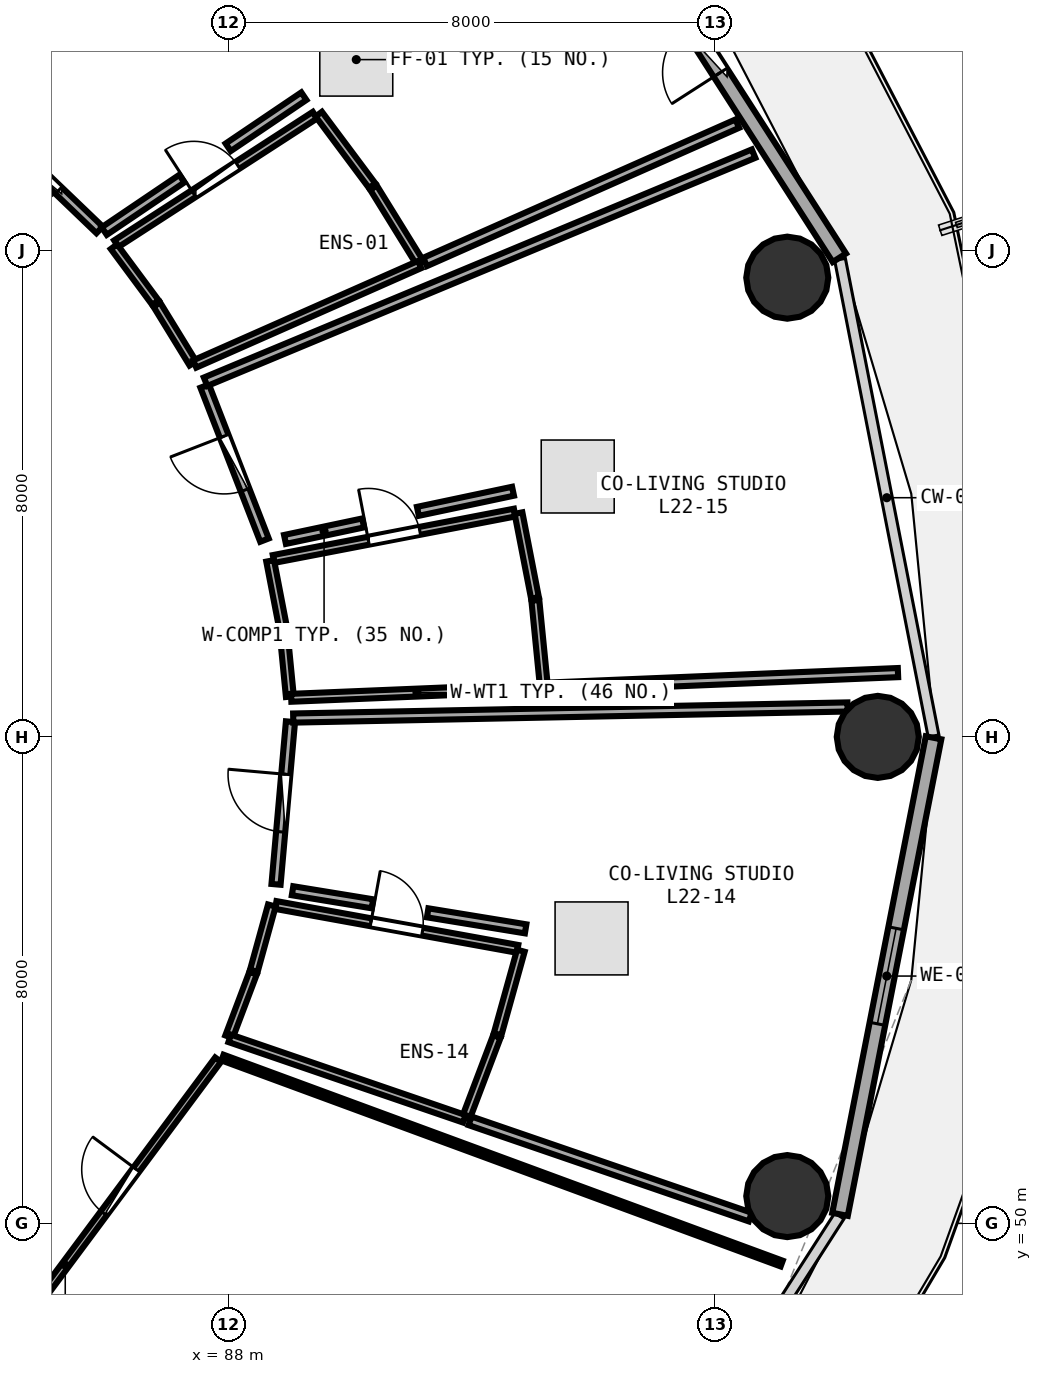
"""IFC4 building model, lengths in metres.
Left out: names, types, materials, properties, quantities, classifications, styles, units other than length and angle.
Written with IfcOpenShell. Run it as: python <this file> out.ifc"""

import sys

from ifc_helpers import new_model, si_unit, direction, frame, frame_2d, origin, origin_2d, place, context, subcontext, project, spatial, rectangle, circle, extrude, element, fill, save


model = new_model("IFC4")
c1 = context("Model", 3, precision=1e-05, world=origin(), true_north=direction((0.0, 1.0)))
c2 = subcontext(c1, "Body", "Model", "MODEL_VIEW")
j1 = project(units=[si_unit("LENGTHUNIT", "METRE"), si_unit("PLANEANGLEUNIT", "RADIAN")], contexts=[c1])
p1 = place(None, origin())
s1 = spatial("IfcSite", under=j1, at=p1, CompositionType="ELEMENT")
p2 = place(p1, origin())
s2 = spatial("IfcBuilding", under=s1, at=p2, CompositionType="ELEMENT")
p3 = place(p2, frame((0.0, 0.0, 87.6)))
s3 = spatial("IfcBuildingStorey", under=s2, at=p3, CompositionType="ELEMENT", Elevation=87.6)
for number, where, z_axis, x_axis in (
    (1, (98.68, 58.0, 0.0), (0.0, 0.0, 1.0), (1.0, 0.0, 0.0)),
    (2, (97.192, 65.552, 0.0), (0.0, 0.0, 1.0), (1.0, 0.0, 0.0)),
    (3, (97.192, 50.448, 0.0), (0.0, 0.0, 1.0), (1.0, 0.0, 0.0)),
):
    element("IfcColumn", number, at=place(p3, frame(where, z_axis=z_axis, x_axis=x_axis)), inside=s3, PredefinedType="COLUMN", context=c2, shape_type="SweptSolid", body=[
        extrude(circle(Radius=0.675, at=origin_2d()), origin(), (0.0, 0.0, 1.0), 3.75),
    ])
p4 = place(p3, frame((98.048, 65.879, 0.0), z_axis=(0.0, 0.0, 1.0), x_axis=(-0.540620528459, 0.841266571432, 0.0)))
e4 = element("IfcWall", 4, at=p4, inside=s3, PredefinedType="SOLIDWALL", context=c2, shape_type="SweptSolid", body=[
    extrude(rectangle(XDim=8.193, YDim=0.26, at=frame_2d((4.096, 0.0))), origin(), (0.0, 0.0, 1.0), 3.475),
])
p5 = place(p4, frame((3.621, 0.0, 0.0)))
e5 = element("IfcOpeningElement", 5, at=p5, cuts=e4, PredefinedType="OPENING", context=c2, shape_type="SweptSolid", body=[
    extrude(rectangle(XDim=0.95, YDim=2.1, at=frame_2d((0.475, 1.05))), frame((0.0, 0.14, 0.0), z_axis=(0.0, -1.0, 0.0), x_axis=(1.0, 0.0, 0.0)), (0.0, 0.0, 1.0), 0.28),
])
p6 = place(p4, frame((4.921, 0.0, 0.85)))
e6 = element("IfcOpeningElement", 6, at=p6, cuts=e4, PredefinedType="OPENING", context=c2, shape_type="SweptSolid", body=[
    extrude(rectangle(XDim=1.2, YDim=1.45, at=frame_2d((0.6, 0.725))), frame((0.0, 0.14, 0.0), z_axis=(0.0, -1.0, 0.0), x_axis=(1.0, 0.0, 0.0)), (0.0, 0.0, 1.0), 0.28),
])
p7 = place(p3, frame((98.059, 50.148, 0.0), z_axis=(0.0, 0.0, 1.0), x_axis=(0.192581843632, 0.981280914674, 0.0)))
e7 = element("IfcWall", 7, at=p7, inside=s3, PredefinedType="SOLIDWALL", context=c2, shape_type="SweptSolid", body=[
    extrude(rectangle(XDim=7.987, YDim=0.26, at=frame_2d((3.993, 0.0))), origin(), (0.0, 0.0, 1.0), 3.475),
])
p8 = place(p7, frame((3.193, 0.0, 0.85)))
e8 = element("IfcOpeningElement", 8, at=p8, cuts=e7, PredefinedType="OPENING", context=c2, shape_type="SweptSolid", body=[
    extrude(rectangle(XDim=1.6, YDim=1.45, at=frame_2d((0.8, 0.725))), frame((0.0, 0.14, 0.0), z_axis=(0.0, -1.0, 0.0), x_axis=(1.0, 0.0, 0.0)), (0.0, 0.0, 1.0), 0.28),
])
p9 = place(p3, frame((86.156, 66.111, 0.0), z_axis=(0.0, 0.0, 1.0), x_axis=(0.839597088747, 0.543209654339, 0.0)))
e9 = element("IfcWall", 9, at=p9, inside=s3, PredefinedType="PLUMBINGWALL", context=c2, shape_type="SweptSolid", body=[
    extrude(rectangle(XDim=3.891, YDim=0.13, at=frame_2d((1.946, 0.0))), origin(), (0.0, 0.0, 1.0), 3.175),
])
p10 = place(p9, frame((1.516, 0.0, 0.0)))
e10 = element("IfcOpeningElement", 10, at=p10, cuts=e9, PredefinedType="OPENING", context=c2, shape_type="SweptSolid", body=[
    extrude(rectangle(XDim=0.86, YDim=2.05, at=frame_2d((0.43, 1.025))), frame((0.0, 0.075, 0.0), z_axis=(0.0, -1.0, 0.0), x_axis=(1.0, 0.0, 0.0)), (0.0, 0.0, 1.0), 0.15),
])
p11 = place(p3, frame((85.882, 66.337, 0.0), z_axis=(0.0, 0.0, 1.0), x_axis=(-0.721698326825, 0.692207718144, 0.0)))
e11 = element("IfcWall", 11, at=p11, inside=s3, PredefinedType="PARTITIONING", context=c2, shape_type="SweptSolid", body=[
    extrude(rectangle(XDim=2.823, YDim=0.15, at=frame_2d((1.412, 0.0))), origin(), (0.0, 0.0, 1.0), 2.925),
])
p12 = place(p11, frame((0.936, 0.0, 0.0)))
e12 = element("IfcOpeningElement", 12, at=p12, cuts=e11, PredefinedType="OPENING", context=c2, shape_type="SweptSolid", body=[
    extrude(rectangle(XDim=0.95, YDim=2.08, at=frame_2d((0.475, 1.04))), frame((0.0, 0.085, 0.0), z_axis=(0.0, -1.0, 0.0), x_axis=(1.0, 0.0, 0.0)), (0.0, 0.0, 1.0), 0.17),
])
p13 = place(p3, frame((84.608, 48.36, 0.0), z_axis=(0.0, 0.0, 1.0), x_axis=(0.596833425992, 0.802365167251, 0.0)))
e13 = element("IfcWall", 13, at=p13, inside=s3, PredefinedType="PARTITIONING", context=c2, shape_type="SweptSolid", body=[
    extrude(rectangle(XDim=5.399, YDim=0.12, at=frame_2d((2.699, 0.0))), origin(), (0.0, 0.0, 1.0), 2.925),
])
p14 = place(p13, frame((2.249, 0.0, 0.0)))
e14 = element("IfcOpeningElement", 14, at=p14, cuts=e13, PredefinedType="OPENING", context=c2, shape_type="SweptSolid", body=[
    extrude(rectangle(XDim=0.9, YDim=2.08, at=frame_2d((0.45, 1.04))), frame((0.0, 0.07, 0.0), z_axis=(0.0, -1.0, 0.0), x_axis=(1.0, 0.0, 0.0)), (0.0, 0.0, 1.0), 0.14),
])
p15 = place(p3, frame((88.779, 55.235, 0.0), z_axis=(0.0, 0.0, 1.0), x_axis=(0.983931701878, -0.178545249279, 0.0)))
e15 = element("IfcWall", 15, at=p15, inside=s3, PredefinedType="PLUMBINGWALL", context=c2, shape_type="SweptSolid", body=[
    extrude(rectangle(XDim=4.042, YDim=0.13, at=frame_2d((2.021, 0.0))), origin(), (0.0, 0.0, 1.0), 3.175),
])
p16 = place(p15, frame((1.591, 0.0, 0.0)))
e16 = element("IfcOpeningElement", 16, at=p16, cuts=e15, PredefinedType="OPENING", context=c2, shape_type="SweptSolid", body=[
    extrude(rectangle(XDim=0.86, YDim=2.05, at=frame_2d((0.43, 1.025))), frame((0.0, 0.075, 0.0), z_axis=(0.0, -1.0, 0.0), x_axis=(1.0, 0.0, 0.0)), (0.0, 0.0, 1.0), 0.15),
])
p17 = place(p3, frame((88.783, 55.575, 0.0), z_axis=(0.0, 0.0, 1.0), x_axis=(0.088469625327, 0.996078875087, 0.0)))
e17 = element("IfcWall", 17, at=p17, inside=s3, PredefinedType="PARTITIONING", context=c2, shape_type="SweptSolid", body=[
    extrude(rectangle(XDim=2.685, YDim=0.15, at=frame_2d((1.343, 0.0))), origin(), (0.0, 0.0, 1.0), 2.925),
])
p18 = place(p17, frame((0.867, 0.0, 0.0)))
e18 = element("IfcOpeningElement", 18, at=p18, cuts=e17, PredefinedType="OPENING", context=c2, shape_type="SweptSolid", body=[
    extrude(rectangle(XDim=0.95, YDim=2.08, at=frame_2d((0.475, 1.04))), frame((0.0, 0.085, 0.0), z_axis=(0.0, -1.0, 0.0), x_axis=(1.0, 0.0, 0.0)), (0.0, 0.0, 1.0), 0.17),
])
p19 = place(p3, frame((88.742, 60.925, 0.0), z_axis=(0.0, 0.0, 1.0), x_axis=(0.981973232987, 0.189020024595, 0.0)))
e19 = element("IfcWall", 19, at=p19, inside=s3, PredefinedType="PLUMBINGWALL", context=c2, shape_type="SweptSolid", body=[
    extrude(rectangle(XDim=4.039, YDim=0.13, at=frame_2d((2.02, 0.0))), origin(), (0.0, 0.0, 1.0), 3.175),
])
p20 = place(p19, frame((1.59, 0.0, 0.0)))
e20 = element("IfcOpeningElement", 20, at=p20, cuts=e19, PredefinedType="OPENING", context=c2, shape_type="SweptSolid", body=[
    extrude(rectangle(XDim=0.86, YDim=2.05, at=frame_2d((0.43, 1.025))), frame((0.0, 0.075, 0.0), z_axis=(0.0, -1.0, 0.0), x_axis=(1.0, 0.0, 0.0)), (0.0, 0.0, 1.0), 0.15),
])
p21 = place(p3, frame((88.593, 61.236, 0.0), z_axis=(0.0, 0.0, 1.0), x_axis=(-0.361969309841, 0.93219001214, 0.0)))
e21 = element("IfcWall", 21, at=p21, inside=s3, PredefinedType="PARTITIONING", context=c2, shape_type="SweptSolid", body=[
    extrude(rectangle(XDim=2.718, YDim=0.15, at=frame_2d((1.359, 0.0))), origin(), (0.0, 0.0, 1.0), 3.235),
])
p22 = place(p21, frame((0.884, 0.0, 0.0)))
e22 = element("IfcOpeningElement", 22, at=p22, cuts=e21, PredefinedType="OPENING", context=c2, shape_type="SweptSolid", body=[
    extrude(rectangle(XDim=0.95, YDim=2.08, at=frame_2d((0.475, 1.04))), frame((0.0, 0.085, 0.0), z_axis=(0.0, -1.0, 0.0), x_axis=(1.0, 0.0, 0.0)), (0.0, 0.0, 1.0), 0.17),
])
p23 = place(p3, frame((87.417, 64.141, 0.0), z_axis=(0.0, 0.0, 1.0), x_axis=(-0.52310141153, 0.852270446077, 0.0)))
e23 = element("IfcWall", 23, at=p23, inside=s3, PredefinedType="PLUMBINGWALL", context=c2, shape_type="SweptSolid", body=[
    extrude(rectangle(XDim=1.135, YDim=0.13, at=frame_2d((0.568, 0.0))), origin(), (0.0, 0.0, 1.0), 2.925),
])
p24 = place(p3, frame((86.8, 65.142, 0.0), z_axis=(0.0, 0.0, 1.0), x_axis=(-0.595625136946, 0.803262532574, 0.0)))
e24 = element("IfcWall", 24, at=p24, inside=s3, PredefinedType="PLUMBINGWALL", context=c2, shape_type="SweptSolid", body=[
    extrude(rectangle(XDim=1.145, YDim=0.13, at=frame_2d((0.573, 0.0))), origin(), (0.0, 0.0, 1.0), 2.925),
])
p25 = place(p3, frame((89.486, 68.241, 0.0), z_axis=(0.0, 0.0, 1.0), x_axis=(0.598215175904, -0.801335512328, 0.0)))
e25 = element("IfcWall", 25, at=p25, inside=s3, PredefinedType="PLUMBINGWALL", context=c2, shape_type="SweptSolid", body=[
    extrude(rectangle(XDim=1.468, YDim=0.13, at=frame_2d((0.734, 0.0))), origin(), (0.0, 0.0, 1.0), 3.48),
])
p26 = place(p3, frame((90.386, 67.032, 0.0), z_axis=(0.0, 0.0, 1.0), x_axis=(0.525910281035, -0.850540049793, 0.0)))
e26 = element("IfcWall", 26, at=p26, inside=s3, PredefinedType="PLUMBINGWALL", context=c2, shape_type="SweptSolid", body=[
    extrude(rectangle(XDim=1.457, YDim=0.13, at=frame_2d((0.729, 0.0))), origin(), (0.0, 0.0, 1.0), 3.48),
])
p27 = place(p3, frame((91.145, 65.768, 0.0), z_axis=(0.0, 0.0, 1.0), x_axis=(-0.914586427441, -0.404390487946, 0.0)))
e27 = element("IfcWall", 27, at=p27, inside=s3, PredefinedType="PLUMBINGWALL", context=c2, shape_type="SweptSolid", body=[
    extrude(rectangle(XDim=4.045, YDim=0.13, at=frame_2d((2.022, 0.0))), origin(), (0.0, 0.0, 1.0), 2.925),
])
p28 = place(p3, frame((83.829, 68.362, 0.0), z_axis=(0.0, 0.0, 1.0), x_axis=(0.698749209364, 0.715366718833, 0.0)))
e28 = element("IfcWall", 28, at=p28, inside=s3, PredefinedType="PARTITIONING", context=c2, shape_type="SweptSolid", body=[
    extrude(rectangle(XDim=9.3, YDim=0.15, at=frame_2d((4.65, 0.0))), origin(), (0.0, 0.0, 1.0), 2.975),
])
p29 = place(p3, frame((96.369, 68.085, 0.0), z_axis=(0.0, 0.0, 1.0), x_axis=(-0.914319955381, -0.404992616219, 0.0)))
e29 = element("IfcWall", 29, at=p29, inside=s3, PredefinedType="PARTITIONING", context=c2, shape_type="SweptSolid", body=[
    extrude(rectangle(XDim=5.616, YDim=0.15, at=frame_2d((2.808, 0.0))), origin(), (0.0, 0.0, 1.0), 2.975),
])
p30 = place(p3, frame((89.241, 68.537, 0.0), z_axis=(0.0, 0.0, 1.0), x_axis=(-0.828582854192, -0.559866460631, 0.0)))
e30 = element("IfcWall", 30, at=p30, inside=s3, PredefinedType="PARTITIONING", context=c2, shape_type="SweptSolid", body=[
    extrude(rectangle(XDim=1.502, YDim=0.15, at=frame_2d((0.751, 0.0))), origin(), (0.0, 0.0, 1.0), 3.175),
])
p31 = place(p3, frame((87.234, 67.181, 0.0), z_axis=(0.0, 0.0, 1.0), x_axis=(-0.828521381114, -0.559957427879, 0.0)))
e31 = element("IfcWall", 31, at=p31, inside=s3, PredefinedType="PARTITIONING", context=c2, shape_type="SweptSolid", body=[
    extrude(rectangle(XDim=1.54, YDim=0.15, at=frame_2d((0.77, 0.0))), origin(), (0.0, 0.0, 1.0), 3.235),
])
p32 = place(p3, frame((86.154, 71.378, 0.0), z_axis=(0.0, 0.0, 1.0), x_axis=(-0.681137169266, -0.732155828116, 0.0)))
e32 = element("IfcWall", 32, at=p32, inside=s3, PredefinedType="PLUMBINGWALL", context=c2, shape_type="SweptSolid", body=[
    extrude(rectangle(XDim=3.847, YDim=0.13, at=frame_2d((1.924, 0.0))), origin(), (0.0, 0.0, 1.0), 3.175),
])
p33 = place(p3, frame((87.904, 52.726, 0.0), z_axis=(0.0, 0.0, 1.0), x_axis=(0.938361829853, -0.345654562063, 0.0)))
e33 = element("IfcWall", 33, at=p33, inside=s3, PredefinedType="PARTITIONING", context=c2, shape_type="SweptSolid", body=[
    extrude(rectangle(XDim=9.8, YDim=0.1, at=frame_2d((4.9, 0.0))), origin(), (0.0, 0.0, 1.0), 2.925),
])
p34 = place(p3, frame((88.01, 53.068, 0.0), z_axis=(0.0, 0.0, 1.0), x_axis=(0.353582849957, 0.93540321157, 0.0)))
e34 = element("IfcWall", 34, at=p34, inside=s3, PredefinedType="PLUMBINGWALL", context=c2, shape_type="SweptSolid", body=[
    extrude(rectangle(XDim=1.12, YDim=0.13, at=frame_2d((0.56, 0.0))), origin(), (0.0, 0.0, 1.0), 3.235),
])
p35 = place(p3, frame((88.418, 54.153, 0.0), z_axis=(0.0, 0.0, 1.0), x_axis=(0.266139738922, 0.963934458024, 0.0)))
e35 = element("IfcWall", 35, at=p35, inside=s3, PredefinedType="PLUMBINGWALL", context=c2, shape_type="SweptSolid", body=[
    extrude(rectangle(XDim=1.114, YDim=0.13, at=frame_2d((0.557, 0.0))), origin(), (0.0, 0.0, 1.0), 3.48),
])
p36 = place(p3, frame((92.81, 54.484, 0.0), z_axis=(0.0, 0.0, 1.0), x_axis=(-0.268041350083, -0.963407408445, 0.0)))
e36 = element("IfcWall", 36, at=p36, inside=s3, PredefinedType="PLUMBINGWALL", context=c2, shape_type="SweptSolid", body=[
    extrude(rectangle(XDim=1.426, YDim=0.13, at=frame_2d((0.713, 0.0))), origin(), (0.0, 0.0, 1.0), 3.48),
])
p37 = place(p3, frame((92.415, 53.072, 0.0), z_axis=(0.0, 0.0, 1.0), x_axis=(-0.354833873896, -0.934929367351, 0.0)))
e37 = element("IfcWall", 37, at=p37, inside=s3, PredefinedType="PLUMBINGWALL", context=c2, shape_type="SweptSolid", body=[
    extrude(rectangle(XDim=1.434, YDim=0.13, at=frame_2d((0.717, 0.0))), origin(), (0.0, 0.0, 1.0), 3.48),
])
p38 = place(p3, frame((91.88, 51.719, 0.0), z_axis=(0.0, 0.0, 1.0), x_axis=(-0.945930729077, 0.324368703466, 0.0)))
e38 = element("IfcWall", 38, at=p38, inside=s3, PredefinedType="PLUMBINGWALL", context=c2, shape_type="SweptSolid", body=[
    extrude(rectangle(XDim=4.079, YDim=0.13, at=frame_2d((2.039, 0.0))), origin(), (0.0, 0.0, 1.0), 3.175),
])
p39 = place(p3, frame((89.066, 58.31, 0.0), z_axis=(0.0, 0.0, 1.0), x_axis=(0.999799952906, 0.020001354173, 0.0)))
e39 = element("IfcWall", 39, at=p39, inside=s3, PredefinedType="PARTITIONING", context=c2, shape_type="SweptSolid", body=[
    extrude(rectangle(XDim=9.118, YDim=0.15, at=frame_2d((4.559, 0.0))), origin(), (0.0, 0.0, 1.0), 3.175),
])
p40 = place(p3, frame((96.583, 50.104, 0.0), z_axis=(0.0, 0.0, 1.0), x_axis=(-0.945793886269, 0.324767493288, 0.0)))
e40 = element("IfcWall", 40, at=p40, inside=s3, PredefinedType="PARTITIONING", context=c2, shape_type="SweptSolid", body=[
    extrude(rectangle(XDim=4.873, YDim=0.15, at=frame_2d((2.437, 0.0))), origin(), (0.0, 0.0, 1.0), 2.925),
])
p41 = place(p3, frame((92.888, 54.844, 0.0), z_axis=(0.0, 0.0, 1.0), x_axis=(-0.986922201966, 0.161197292988, 0.0)))
e41 = element("IfcWall", 41, at=p41, inside=s3, PredefinedType="PARTITIONING", context=c2, shape_type="SweptSolid", body=[
    extrude(rectangle(XDim=1.633, YDim=0.15, at=frame_2d((0.816, 0.0))), origin(), (0.0, 0.0, 1.0), 3.175),
])
p42 = place(p3, frame((90.369, 55.255, 0.0), z_axis=(0.0, 0.0, 1.0), x_axis=(-0.986928715278, 0.161157410501, 0.0)))
e42 = element("IfcWall", 42, at=p42, inside=s3, PredefinedType="PARTITIONING", context=c2, shape_type="SweptSolid", body=[
    extrude(rectangle(XDim=1.332, YDim=0.15, at=frame_2d((0.666, 0.0))), origin(), (0.0, 0.0, 1.0), 3.48),
])
p43 = place(p3, frame((89.011, 58.662, 0.0), z_axis=(0.0, 0.0, 1.0), x_axis=(-0.097430149617, 0.995242365429, 0.0)))
e43 = element("IfcWall", 43, at=p43, inside=s3, PredefinedType="PLUMBINGWALL", context=c2, shape_type="SweptSolid", body=[
    extrude(rectangle(XDim=1.108, YDim=0.13, at=frame_2d((0.554, 0.0))), origin(), (0.0, 0.0, 1.0), 3.48),
])
p44 = place(p3, frame((88.897, 59.804, 0.0), z_axis=(0.0, 0.0, 1.0), x_axis=(-0.18947511119, 0.981885523999, 0.0)))
e44 = element("IfcWall", 44, at=p44, inside=s3, PredefinedType="PLUMBINGWALL", context=c2, shape_type="SweptSolid", body=[
    extrude(rectangle(XDim=1.111, YDim=0.13, at=frame_2d((0.555, 0.0))), origin(), (0.0, 0.0, 1.0), 3.48),
])
p45 = place(p3, frame((92.771, 61.68, 0.0), z_axis=(0.0, 0.0, 1.0), x_axis=(0.191058204905, -0.981578709192, 0.0)))
e45 = element("IfcWall", 45, at=p45, inside=s3, PredefinedType="PLUMBINGWALL", context=c2, shape_type="SweptSolid", body=[
    extrude(rectangle(XDim=1.421, YDim=0.13, at=frame_2d((0.71, 0.0))), origin(), (0.0, 0.0, 1.0), 3.48),
])
p46 = place(p3, frame((93.048, 60.246, 0.0), z_axis=(0.0, 0.0, 1.0), x_axis=(0.098651373381, -0.995122056097, 0.0)))
e46 = element("IfcWall", 46, at=p46, inside=s3, PredefinedType="PLUMBINGWALL", context=c2, shape_type="SweptSolid", body=[
    extrude(rectangle(XDim=1.418, YDim=0.13, at=frame_2d((0.709, 0.0))), origin(), (0.0, 0.0, 1.0), 3.48),
])
p47 = place(p3, frame((93.17, 58.814, 0.0), z_axis=(0.0, 0.0, 1.0), x_axis=(-0.999142957242, -0.041392644201, 0.0)))
e47 = element("IfcWall", 47, at=p47, inside=s3, PredefinedType="PLUMBINGWALL", context=c2, shape_type="SweptSolid", body=[
    extrude(rectangle(XDim=4.141, YDim=0.13, at=frame_2d((2.07, 0.0))), origin(), (0.0, 0.0, 1.0), 3.175),
])
p48 = place(p3, frame((87.625, 63.84, 0.0), z_axis=(0.0, 0.0, 1.0), x_axis=(0.92321744991, 0.384277946521, 0.0)))
e48 = element("IfcWall", 48, at=p48, inside=s3, PredefinedType="PARTITIONING", context=c2, shape_type="SweptSolid", body=[
    extrude(rectangle(XDim=9.762, YDim=0.15, at=frame_2d((4.881, 0.0))), origin(), (0.0, 0.0, 1.0), 2.925),
])
p49 = place(p3, frame((99.012, 59.057, 0.0), z_axis=(0.0, 0.0, 1.0), x_axis=(-0.999136530054, -0.041547494638, 0.0)))
e49 = element("IfcWall", 49, at=p49, inside=s3, PredefinedType="PARTITIONING", context=c2, shape_type="SweptSolid", body=[
    extrude(rectangle(XDim=5.747, YDim=0.15, at=frame_2d((2.874, 0.0))), origin(), (0.0, 0.0, 1.0), 2.975),
])
p50 = place(p3, frame((92.681, 62.04, 0.0), z_axis=(0.0, 0.0, 1.0), x_axis=(-0.978359809994, -0.206910807327, 0.0)))
e50 = element("IfcWall", 50, at=p50, inside=s3, PredefinedType="PARTITIONING", context=c2, shape_type="SweptSolid", body=[
    extrude(rectangle(XDim=1.599, YDim=0.15, at=frame_2d((0.799, 0.0))), origin(), (0.0, 0.0, 1.0), 3.175),
])
p51 = place(p3, frame((90.216, 61.519, 0.0), z_axis=(0.0, 0.0, 1.0), x_axis=(-0.978356212177, -0.206927818562, 0.0)))
e51 = element("IfcWall", 51, at=p51, inside=s3, PredefinedType="PARTITIONING", context=c2, shape_type="SweptSolid", body=[
    extrude(rectangle(XDim=1.314, YDim=0.15, at=frame_2d((0.657, 0.0))), origin(), (0.0, 0.0, 1.0), 3.48),
])
p52 = place(p5, frame((0.95, 0.0, 0.0), z_axis=(0.0, 0.0, 1.0), x_axis=(-1.0, 0.0, 0.0)))
e52 = element("IfcDoor", 52, at=p52, inside=s3, OperationType="SINGLE_SWING_RIGHT", PredefinedType="DOOR", context=c2, shape_type="SweptSolid", body=[
    extrude(rectangle(XDim=0.95, YDim=2.1, at=frame_2d((0.475, 1.05))), frame((0.0, 0.025, 0.0), z_axis=(0.0, -1.0, 0.0), x_axis=(1.0, 0.0, 0.0)), (0.0, 0.0, 1.0), 0.05),
])
fill(e5, e52)
p53 = place(p8, origin())
e53 = element("IfcWindow", 53, at=p53, inside=s3, PartitioningType="SINGLE_PANEL", PredefinedType="WINDOW", context=c2, shape_type="SweptSolid", body=[
    extrude(rectangle(XDim=1.6, YDim=1.45, at=frame_2d((0.8, 0.725))), frame((0.0, 0.03, 0.0), z_axis=(0.0, -1.0, 0.0), x_axis=(1.0, 0.0, 0.0)), (0.0, 0.0, 1.0), 0.06),
])
fill(e8, e53)
p54 = place(p10, origin())
e54 = element("IfcDoor", 54, at=p54, inside=s3, OperationType="SINGLE_SWING_LEFT", PredefinedType="DOOR", context=c2, shape_type="SweptSolid", body=[
    extrude(rectangle(XDim=0.86, YDim=2.05, at=frame_2d((0.43, 1.025))), frame((0.0, 0.025, 0.0), z_axis=(0.0, -1.0, 0.0), x_axis=(1.0, 0.0, 0.0)), (0.0, 0.0, 1.0), 0.05),
])
fill(e10, e54)
p55 = place(p12, origin())
e55 = element("IfcDoor", 55, at=p55, inside=s3, OperationType="SINGLE_SWING_RIGHT", PredefinedType="DOOR", context=c2, shape_type="SweptSolid", body=[
    extrude(rectangle(XDim=0.95, YDim=2.08, at=frame_2d((0.475, 1.04))), frame((0.0, 0.025, 0.0), z_axis=(0.0, -1.0, 0.0), x_axis=(1.0, 0.0, 0.0)), (0.0, 0.0, 1.0), 0.05),
])
fill(e12, e55)
p56 = place(p14, origin())
e56 = element("IfcDoor", 56, at=p56, inside=s3, OperationType="SINGLE_SWING_RIGHT", PredefinedType="DOOR", context=c2, shape_type="SweptSolid", body=[
    extrude(rectangle(XDim=0.9, YDim=2.08, at=frame_2d((0.45, 1.04))), frame((0.0, 0.025, 0.0), z_axis=(0.0, -1.0, 0.0), x_axis=(1.0, 0.0, 0.0)), (0.0, 0.0, 1.0), 0.05),
])
fill(e14, e56)
p57 = place(p16, origin())
e57 = element("IfcDoor", 57, at=p57, inside=s3, OperationType="SINGLE_SWING_LEFT", PredefinedType="DOOR", context=c2, shape_type="SweptSolid", body=[
    extrude(rectangle(XDim=0.86, YDim=2.05, at=frame_2d((0.43, 1.025))), frame((0.0, 0.025, 0.0), z_axis=(0.0, -1.0, 0.0), x_axis=(1.0, 0.0, 0.0)), (0.0, 0.0, 1.0), 0.05),
])
fill(e16, e57)
p58 = place(p18, origin())
e58 = element("IfcDoor", 58, at=p58, inside=s3, OperationType="SINGLE_SWING_RIGHT", PredefinedType="DOOR", context=c2, shape_type="SweptSolid", body=[
    extrude(rectangle(XDim=0.95, YDim=2.08, at=frame_2d((0.475, 1.04))), frame((0.0, 0.025, 0.0), z_axis=(0.0, -1.0, 0.0), x_axis=(1.0, 0.0, 0.0)), (0.0, 0.0, 1.0), 0.05),
])
fill(e18, e58)
p59 = place(p20, origin())
e59 = element("IfcDoor", 59, at=p59, inside=s3, OperationType="SINGLE_SWING_LEFT", PredefinedType="DOOR", context=c2, shape_type="SweptSolid", body=[
    extrude(rectangle(XDim=0.86, YDim=2.05, at=frame_2d((0.43, 1.025))), frame((0.0, 0.025, 0.0), z_axis=(0.0, -1.0, 0.0), x_axis=(1.0, 0.0, 0.0)), (0.0, 0.0, 1.0), 0.05),
])
fill(e20, e59)
p60 = place(p22, origin())
e60 = element("IfcDoor", 60, at=p60, inside=s3, OperationType="SINGLE_SWING_RIGHT", PredefinedType="DOOR", context=c2, shape_type="SweptSolid", body=[
    extrude(rectangle(XDim=0.95, YDim=2.08, at=frame_2d((0.475, 1.04))), frame((0.0, 0.025, 0.0), z_axis=(0.0, -1.0, 0.0), x_axis=(1.0, 0.0, 0.0)), (0.0, 0.0, 1.0), 0.05),
])
fill(e22, e60)
save(model, sys.argv[1])
